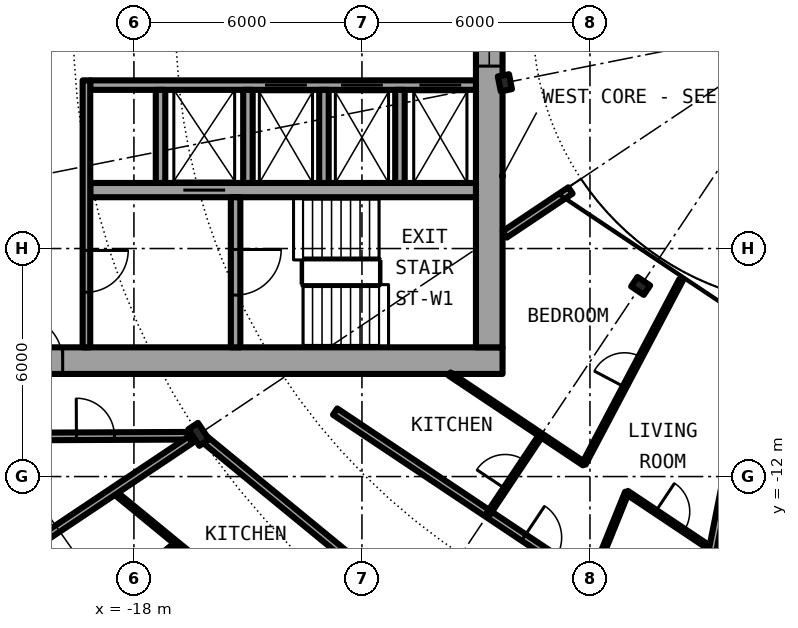
"""IFC4 building model, lengths in metres.
Left out: names, types, materials, properties, quantities, classifications, styles, units other than length and angle.
Written with IfcOpenShell. Run it as: python <this file> out.ifc"""

import sys

from ifc_helpers import new_model, si_unit, direction, frame, frame_2d, origin, origin_2d, place, context, subcontext, project, spatial, rectangle, i_section, extrude, element, fill, save


model = new_model("IFC4")
c1 = context("Model", 3, precision=1e-05, world=origin(), true_north=direction((0.0, 1.0)))
c2 = subcontext(c1, "Body", "Model", "MODEL_VIEW")
j1 = project(units=[si_unit("LENGTHUNIT", "METRE"), si_unit("PLANEANGLEUNIT", "RADIAN")], contexts=[c1])
p1 = place(None, origin())
s1 = spatial("IfcSite", under=j1, at=p1, CompositionType="ELEMENT")
p2 = place(p1, origin())
s2 = spatial("IfcBuilding", under=s1, at=p2, CompositionType="ELEMENT")
p3 = place(p2, frame((0.0, 0.0, 91.05)))
s3 = spatial("IfcBuildingStorey", under=s2, at=p3, CompositionType="ELEMENT", Elevation=91.05)
p4 = place(p3, frame((-16.297, -10.889, 0.0), z_axis=(0.0, 0.0, 1.0), x_axis=(-0.831469612303, -0.55557023302, 0.0)))
e1 = element("IfcColumn", 1, at=p4, inside=s3, PredefinedType="COLUMN", context=c2, shape_type="SweptSolid", body=[
    extrude(i_section(OverallWidth=0.306, OverallDepth=0.524, WebThickness=0.021, FlangeThickness=0.04, FilletRadius=0.027, at=origin_2d()), origin(), (0.0, 0.0, 1.0), 3.05),
])
for number, where, z_axis, x_axis in (
    (2, (-8.239, -1.639, 0.0), (0.0, 0.0, 1.0), (-0.981, -0.195, 0.0)),
    (3, (-4.667, -6.984, 0.0), (0.0, 0.0, 1.0), (-0.556, -0.831, 0.0)),
):
    element("IfcColumn", number, at=place(p3, frame(where, z_axis=z_axis, x_axis=x_axis)), inside=s3, PredefinedType="COLUMN", context=c2, shape_type="SweptSolid", body=[
        extrude(i_section(OverallWidth=0.3, OverallDepth=0.4, WebThickness=0.013, FlangeThickness=0.024, FilletRadius=0.027, at=origin_2d()), origin(), (0.0, 0.0, 1.0), 3.05),
    ])
p5 = place(p3, frame((-22.3, -8.95, 0.0), z_axis=(0.0, 0.0, 1.0), x_axis=(1.0, 0.0, 0.0)))
e4 = element("IfcWall", 4, at=p5, inside=s3, PredefinedType="SHEAR", context=c2, shape_type="SweptSolid", body=[
    extrude(rectangle(XDim=14.0, YDim=0.7, at=frame_2d((7.0, 0.0))), origin(), (0.0, 0.0, 1.0), 3.05),
])
p6 = place(p5, frame((1.225, 0.0, 0.0)))
e5 = element("IfcOpeningElement", 5, at=p6, cuts=e4, PredefinedType="OPENING", context=c2, shape_type="SweptSolid", body=[
    extrude(rectangle(XDim=1.2, YDim=2.3, at=frame_2d((0.6, 1.15))), frame((0.0, 0.36, 0.0), z_axis=(0.0, -1.0, 0.0), x_axis=(1.0, 0.0, 0.0)), (0.0, 0.0, 1.0), 0.72),
])
p7 = place(p3, frame((-8.65, 8.6, 0.0), z_axis=(0.0, 0.0, 1.0), x_axis=(0.0, -1.0, 0.0)))
e6 = element("IfcWall", 6, at=p7, inside=s3, PredefinedType="SHEAR", context=c2, shape_type="SweptSolid", body=[
    extrude(rectangle(XDim=17.2, YDim=0.7, at=frame_2d((8.6, 0.0))), origin(), (0.0, 0.0, 1.0), 3.05),
])
p8 = place(p7, frame((7.4, 0.0, 0.1)))
e7 = element("IfcOpeningElement", 7, at=p8, cuts=e6, PredefinedType="OPENING", context=c2, shape_type="SweptSolid", body=[
    extrude(rectangle(XDim=2.4, YDim=2.2, at=frame_2d((1.2, 1.1))), frame((0.0, 0.36, 0.0), z_axis=(0.0, -1.0, 0.0), x_axis=(1.0, 0.0, 0.0)), (0.0, 0.0, 1.0), 0.72),
])
p9 = place(p3, frame((-9.0, -1.7, 0.0), z_axis=(0.0, 0.0, 1.0), x_axis=(-1.0, 0.0, 0.0)))
e8 = element("IfcWall", 8, at=p9, inside=s3, PredefinedType="SHEAR", context=c2, shape_type="SweptSolid", body=[
    extrude(rectangle(XDim=10.15, YDim=0.25, at=frame_2d((5.075, 0.0))), origin(), (0.0, 0.0, 1.0), 3.05),
])
p10 = place(p9, frame((0.387, 0.0, 0.0)))
e9 = element("IfcOpeningElement", 9, at=p10, cuts=e8, PredefinedType="OPENING", context=c2, shape_type="SweptSolid", body=[
    extrude(rectangle(XDim=1.1, YDim=2.3, at=frame_2d((0.55, 1.15))), frame((0.0, 0.135, 0.0), z_axis=(0.0, -1.0, 0.0), x_axis=(1.0, 0.0, 0.0)), (0.0, 0.0, 1.0), 0.27),
])
p11 = place(p9, frame((2.45, 0.0, 0.0)))
e10 = element("IfcOpeningElement", 10, at=p11, cuts=e8, PredefinedType="OPENING", context=c2, shape_type="SweptSolid", body=[
    extrude(rectangle(XDim=1.1, YDim=2.3, at=frame_2d((0.55, 1.15))), frame((0.0, 0.135, 0.0), z_axis=(0.0, -1.0, 0.0), x_axis=(1.0, 0.0, 0.0)), (0.0, 0.0, 1.0), 0.27),
])
p12 = place(p9, frame((4.45, 0.0, 0.0)))
e11 = element("IfcOpeningElement", 11, at=p12, cuts=e8, PredefinedType="OPENING", context=c2, shape_type="SweptSolid", body=[
    extrude(rectangle(XDim=1.1, YDim=2.3, at=frame_2d((0.55, 1.15))), frame((0.0, 0.135, 0.0), z_axis=(0.0, -1.0, 0.0), x_axis=(1.0, 0.0, 0.0)), (0.0, 0.0, 1.0), 0.27),
])
p13 = place(p3, frame((-9.0, -4.462, 0.0), z_axis=(0.0, 0.0, 1.0), x_axis=(-1.0, 0.0, 0.0)))
e12 = element("IfcWall", 12, at=p13, inside=s3, PredefinedType="SHEAR", context=c2, shape_type="SweptSolid", body=[
    extrude(rectangle(XDim=10.15, YDim=0.375, at=frame_2d((5.075, 0.0))), origin(), (0.0, 0.0, 1.0), 3.05),
])
p14 = place(p13, frame((6.6, 0.0, 0.0)))
e13 = element("IfcOpeningElement", 13, at=p14, cuts=e12, PredefinedType="OPENING", context=c2, shape_type="SweptSolid", body=[
    extrude(rectangle(XDim=1.1, YDim=2.3, at=frame_2d((0.55, 1.15))), frame((0.0, 0.198, 0.0), z_axis=(0.0, -1.0, 0.0), x_axis=(1.0, 0.0, 0.0)), (0.0, 0.0, 1.0), 0.395),
])
p15 = place(p3, frame((-15.325, -4.65, 0.0), z_axis=(0.0, 0.0, 1.0), x_axis=(0.0, -1.0, 0.0)))
e14 = element("IfcWall", 14, at=p15, inside=s3, PredefinedType="SHEAR", context=c2, shape_type="SweptSolid", body=[
    extrude(rectangle(XDim=3.95, YDim=0.25, at=frame_2d((1.975, 0.0))), origin(), (0.0, 0.0, 1.0), 3.05),
])
p16 = place(p15, frame((1.375, 0.0, 0.0)))
e15 = element("IfcOpeningElement", 15, at=p16, cuts=e14, PredefinedType="OPENING", context=c2, shape_type="SweptSolid", body=[
    extrude(rectangle(XDim=1.2, YDim=2.3, at=frame_2d((0.6, 1.15))), frame((0.0, 0.135, 0.0), z_axis=(0.0, -1.0, 0.0), x_axis=(1.0, 0.0, 0.0)), (0.0, 0.0, 1.0), 0.27),
])
for number, where, z_axis, x_axis in (
    (16, (-15.0, -1.825, 0.0), (0.0, 0.0, 1.0), (0.0, -1.0, 0.0)),
    (17, (-17.3, -1.825, 0.0), (0.0, 0.0, 1.0), (0.0, -1.0, 0.0)),
):
    element("IfcWall", number, at=place(p3, frame(where, z_axis=z_axis, x_axis=x_axis)), inside=s3, PredefinedType="SOLIDWALL", context=c2, shape_type="SweptSolid", body=[
        extrude(rectangle(XDim=2.45, YDim=0.25, at=frame_2d((1.225, 0.0))), origin(), (0.0, 0.0, 1.0), 2.7),
    ])
p17 = place(p3, frame((-19.25, -1.575, 0.0), z_axis=(0.0, 0.0, 1.0), x_axis=(0.0, -1.0, 0.0)))
e18 = element("IfcWall", 18, at=p17, inside=s3, PredefinedType="SOLIDWALL", context=c2, shape_type="SweptSolid", body=[
    extrude(rectangle(XDim=7.025, YDim=0.2, at=frame_2d((3.513, 0.0))), origin(), (0.0, 0.0, 1.0), 2.7),
])
p18 = place(p17, frame((4.475, 0.0, 0.0)))
e19 = element("IfcOpeningElement", 19, at=p18, cuts=e18, PredefinedType="OPENING", context=c2, shape_type="SweptSolid", body=[
    extrude(rectangle(XDim=1.1, YDim=2.3, at=frame_2d((0.55, 1.15))), frame((0.0, 0.11, 0.0), z_axis=(0.0, -1.0, 0.0), x_axis=(1.0, 0.0, 0.0)), (0.0, 0.0, 1.0), 0.22),
])
for number, where, z_axis, x_axis in (
    (20, (-11.0, -1.825, 0.0), (0.0, 0.0, 1.0), (0.0, -1.0, 0.0)),
    (21, (-13.0, -1.825, 0.0), (0.0, 0.0, 1.0), (0.0, -1.0, 0.0)),
):
    element("IfcWall", number, at=place(p3, frame(where, z_axis=z_axis, x_axis=x_axis)), inside=s3, PredefinedType="SOLIDWALL", context=c2, shape_type="SweptSolid", body=[
        extrude(rectangle(XDim=2.45, YDim=0.25, at=frame_2d((1.225, 0.0))), origin(), (0.0, 0.0, 1.0), 2.7),
    ])
p19 = place(p3, frame((-18.542, -12.389, 0.0), z_axis=(0.0, 0.0, 1.0), x_axis=(0.77296666644, -0.634446634929, 0.0)))
e22 = element("IfcWall", 22, at=p19, inside=s3, PredefinedType="PARTITIONING", context=c2, shape_type="SweptSolid", body=[
    extrude(rectangle(XDim=6.474, YDim=0.1, at=frame_2d((3.237, 0.0))), origin(), (0.0, 0.0, 1.0), 2.7),
])
p20 = place(p3, frame((-16.173, -10.991, 0.0), z_axis=(0.0, 0.0, 1.0), x_axis=(0.773013989296, -0.634388975591, 0.0)))
e23 = element("IfcWall", 23, at=p20, inside=s3, PredefinedType="PARTITIONING", context=c2, shape_type="SweptSolid", body=[
    extrude(rectangle(XDim=11.219, YDim=0.2, at=frame_2d((5.609, 0.0))), origin(), (0.0, 0.0, 1.0), 2.38),
])
p21 = place(p20, frame((6.278, 0.0, 0.0)))
e24 = element("IfcOpeningElement", 24, at=p21, cuts=e23, PredefinedType="OPENING", context=c2, shape_type="SweptSolid", body=[
    extrude(rectangle(XDim=1.0, YDim=2.3, at=frame_2d((0.5, 1.15))), frame((0.0, 0.11, 0.0), z_axis=(0.0, -1.0, 0.0), x_axis=(1.0, 0.0, 0.0)), (0.0, 0.0, 1.0), 0.22),
])
p22 = place(p3, frame((-12.706, -10.291, 0.0), z_axis=(0.0, 0.0, 1.0), x_axis=(0.831588572532, -0.555392155178, 0.0)))
e25 = element("IfcWall", 25, at=p22, inside=s3, PredefinedType="PARTITIONING", context=c2, shape_type="SweptSolid", body=[
    extrude(rectangle(XDim=11.314, YDim=0.2, at=frame_2d((5.657, 0.0))), origin(), (0.0, 0.0, 1.0), 2.7),
])
p23 = place(p22, frame((5.966, 0.0, 0.0)))
e26 = element("IfcOpeningElement", 26, at=p23, cuts=e25, PredefinedType="OPENING", context=c2, shape_type="SweptSolid", body=[
    extrude(rectangle(XDim=1.0, YDim=2.3, at=frame_2d((0.5, 1.15))), frame((0.0, 0.11, 0.0), z_axis=(0.0, -1.0, 0.0), x_axis=(1.0, 0.0, 0.0)), (0.0, 0.0, 1.0), 0.22),
])
p24 = place(p3, frame((-2.772, -13.927, 0.0), z_axis=(0.0, 0.0, 1.0), x_axis=(0.998787571158, 0.04922791586, 0.0)))
e27 = element("IfcWall", 27, at=p24, inside=s3, PredefinedType="PARTITIONING", context=c2, shape_type="SweptSolid", body=[
    extrude(rectangle(XDim=2.762, YDim=0.1, at=frame_2d((1.381, 0.0))), origin(), (0.0, 0.0, 1.0), 2.7),
])
p25 = place(p24, frame((0.933, 0.0, 0.0)))
e28 = element("IfcOpeningElement", 28, at=p25, cuts=e27, PredefinedType="OPENING", context=c2, shape_type="SweptSolid", body=[
    extrude(rectangle(XDim=0.9, YDim=2.3, at=frame_2d((0.45, 1.15))), frame((0.0, 0.06, 0.0), z_axis=(0.0, -1.0, 0.0), x_axis=(1.0, 0.0, 0.0)), (0.0, 0.0, 1.0), 0.12),
])
p26 = place(p3, frame((-9.693, -9.302, 0.0), z_axis=(0.0, 0.0, 1.0), x_axis=(0.831546497949, -0.555455148278, 0.0)))
e29 = element("IfcWall", 29, at=p26, inside=s3, PredefinedType="PARTITIONING", context=c2, shape_type="SweptSolid", body=[
    extrude(rectangle(XDim=4.252, YDim=0.1, at=frame_2d((2.126, 0.0))), origin(), (0.0, 0.0, 1.0), 2.7),
])
p27 = place(p3, frame((-5.029, -12.418, 0.0), z_axis=(0.0, 0.0, 1.0), x_axis=(0.831538390496, -0.555467285384, 0.0)))
e30 = element("IfcWall", 30, at=p27, inside=s3, PredefinedType="PARTITIONING", context=c2, shape_type="SweptSolid", body=[
    extrude(rectangle(XDim=2.717, YDim=0.1, at=frame_2d((1.358, 0.0))), origin(), (0.0, 0.0, 1.0), 2.7),
])
p28 = place(p27, frame((0.908, 0.0, 0.0)))
e31 = element("IfcOpeningElement", 31, at=p28, cuts=e30, PredefinedType="OPENING", context=c2, shape_type="SweptSolid", body=[
    extrude(rectangle(XDim=0.9, YDim=2.3, at=frame_2d((0.45, 1.15))), frame((0.0, 0.06, 0.0), z_axis=(0.0, -1.0, 0.0), x_axis=(1.0, 0.0, 0.0)), (0.0, 0.0, 1.0), 0.12),
])
p29 = place(p3, frame((-21.675, -10.95, 0.0), z_axis=(0.0, 0.0, 1.0), x_axis=(0.999988944514, 0.004702217579, 0.0)))
e32 = element("IfcWall", 32, at=p29, inside=s3, PredefinedType="PARTITIONING", context=c2, shape_type="SweptSolid", body=[
    extrude(rectangle(XDim=5.088, YDim=0.2, at=frame_2d((2.544, 0.0))), origin(), (0.0, 0.0, 1.0), 2.7),
])
p30 = place(p29, frame((2.162, 0.0, 0.0)))
e33 = element("IfcOpeningElement", 33, at=p30, cuts=e32, PredefinedType="OPENING", context=c2, shape_type="SweptSolid", body=[
    extrude(rectangle(XDim=1.0, YDim=2.3, at=frame_2d((0.5, 1.15))), frame((0.0, 0.11, 0.0), z_axis=(0.0, -1.0, 0.0), x_axis=(1.0, 0.0, 0.0)), (0.0, 0.0, 1.0), 0.22),
])
p31 = place(p3, frame((-6.513, -4.472, 0.0), z_axis=(0.0, 0.0, 1.0), x_axis=(-0.831382204863, -0.555701025225, 0.0)))
e34 = element("IfcWall", 34, at=p31, inside=s3, PredefinedType="PARTITIONING", context=c2, shape_type="SweptSolid", body=[
    extrude(rectangle(XDim=2.082, YDim=0.2, at=frame_2d((1.041, 0.0))), origin(), (0.0, 0.0, 1.0), 2.7),
])
p32 = place(p3, frame((-22.595, -15.097, 0.0), z_axis=(0.0, 0.0, 1.0), x_axis=(0.831505405283, 0.555516661303, 0.0)))
e35 = element("IfcWall", 35, at=p32, inside=s3, PredefinedType="PARTITIONING", context=c2, shape_type="SweptSolid", body=[
    extrude(rectangle(XDim=7.312, YDim=0.2, at=frame_2d((3.656, 0.0))), origin(), (0.0, 0.0, 1.0), 2.7),
])
p33 = place(p3, frame((-21.061, -17.173, 0.0), z_axis=(0.0, 0.0, 1.0), x_axis=(0.774926754572, 0.632051046236, 0.0)))
e36 = element("IfcWall", 36, at=p33, inside=s3, PredefinedType="PARTITIONING", context=c2, shape_type="SweptSolid", body=[
    extrude(rectangle(XDim=5.403, YDim=0.1, at=frame_2d((2.702, 0.0))), origin(), (0.0, 0.0, 1.0), 2.7),
])
p34 = place(p33, frame((2.252, 0.0, 0.0)))
e37 = element("IfcOpeningElement", 37, at=p34, cuts=e36, PredefinedType="OPENING", context=c2, shape_type="SweptSolid", body=[
    extrude(rectangle(XDim=0.9, YDim=2.3, at=frame_2d((0.45, 1.15))), frame((0.0, 0.06, 0.0), z_axis=(0.0, -1.0, 0.0), x_axis=(1.0, 0.0, 0.0)), (0.0, 0.0, 1.0), 0.12),
])
p35 = place(p3, frame((-8.674, -12.982, 0.0), z_axis=(0.0, 0.0, 1.0), x_axis=(0.555355163998, 0.831613276602, 0.0)))
e38 = element("IfcWall", 38, at=p35, inside=s3, PredefinedType="PARTITIONING", context=c2, shape_type="SweptSolid", body=[
    extrude(rectangle(XDim=2.494, YDim=0.1, at=frame_2d((1.247, 0.0))), origin(), (0.0, 0.0, 1.0), 2.7),
])
p36 = place(p35, frame((0.797, 0.0, 0.0)))
e39 = element("IfcOpeningElement", 39, at=p36, cuts=e38, PredefinedType="OPENING", context=c2, shape_type="SweptSolid", body=[
    extrude(rectangle(XDim=0.9, YDim=2.3, at=frame_2d((0.45, 1.15))), frame((0.0, 0.06, 0.0), z_axis=(0.0, -1.0, 0.0), x_axis=(1.0, 0.0, 0.0)), (0.0, 0.0, 1.0), 0.12),
])
p37 = place(p3, frame((-6.158, -11.663, 0.0), z_axis=(0.0, 0.0, 1.0), x_axis=(0.466976820365, 0.884269556889, 0.0)))
e40 = element("IfcWall", 40, at=p37, inside=s3, PredefinedType="PARTITIONING", context=c2, shape_type="SweptSolid", body=[
    extrude(rectangle(XDim=5.469, YDim=0.1, at=frame_2d((2.735, 0.0))), origin(), (0.0, 0.0, 1.0), 2.7),
])
p38 = place(p37, frame((2.284, 0.0, 0.0)))
e41 = element("IfcOpeningElement", 41, at=p38, cuts=e40, PredefinedType="OPENING", context=c2, shape_type="SweptSolid", body=[
    extrude(rectangle(XDim=0.9, YDim=2.3, at=frame_2d((0.45, 1.15))), frame((0.0, 0.06, 0.0), z_axis=(0.0, -1.0, 0.0), x_axis=(1.0, 0.0, 0.0)), (0.0, 0.0, 1.0), 0.12),
])
p39 = place(p3, frame((-5.986, -14.779, 0.0), z_axis=(0.0, 0.0, 1.0), x_axis=(0.375649498413, 0.926761811008, 0.0)))
e42 = element("IfcWall", 42, at=p39, inside=s3, PredefinedType="PARTITIONING", context=c2, shape_type="SweptSolid", body=[
    extrude(rectangle(XDim=2.548, YDim=0.1, at=frame_2d((1.274, 0.0))), origin(), (0.0, 0.0, 1.0), 2.7),
])
p40 = place(p3, frame((-3.297, -16.575, 0.0), z_axis=(0.0, 0.0, 1.0), x_axis=(0.19511354088, 0.980780661598, 0.0)))
e43 = element("IfcWall", 43, at=p40, inside=s3, PredefinedType="PARTITIONING", context=c2, shape_type="SweptSolid", body=[
    extrude(rectangle(XDim=9.179, YDim=0.2, at=frame_2d((4.59, 0.0))), origin(), (0.0, 0.0, 1.0), 2.7),
])
p41 = place(p10, origin())
e44 = element("IfcDoor", 44, at=p41, inside=s3, OperationType="DOUBLE_DOOR_SLIDING", PredefinedType="DOOR", context=c2, shape_type="SweptSolid", body=[
    extrude(rectangle(XDim=1.1, YDim=2.3, at=frame_2d((0.55, 1.15))), frame((0.0, 0.025, 0.0), z_axis=(0.0, -1.0, 0.0), x_axis=(1.0, 0.0, 0.0)), (0.0, 0.0, 1.0), 0.05),
])
fill(e9, e44)
p42 = place(p11, origin())
e45 = element("IfcDoor", 45, at=p42, inside=s3, OperationType="DOUBLE_DOOR_SLIDING", PredefinedType="DOOR", context=c2, shape_type="SweptSolid", body=[
    extrude(rectangle(XDim=1.1, YDim=2.3, at=frame_2d((0.55, 1.15))), frame((0.0, 0.025, 0.0), z_axis=(0.0, -1.0, 0.0), x_axis=(1.0, 0.0, 0.0)), (0.0, 0.0, 1.0), 0.05),
])
fill(e10, e45)
p43 = place(p12, origin())
e46 = element("IfcDoor", 46, at=p43, inside=s3, OperationType="DOUBLE_DOOR_SLIDING", PredefinedType="DOOR", context=c2, shape_type="SweptSolid", body=[
    extrude(rectangle(XDim=1.1, YDim=2.3, at=frame_2d((0.55, 1.15))), frame((0.0, 0.025, 0.0), z_axis=(0.0, -1.0, 0.0), x_axis=(1.0, 0.0, 0.0)), (0.0, 0.0, 1.0), 0.05),
])
fill(e11, e46)
p44 = place(p14, origin())
e47 = element("IfcDoor", 47, at=p44, inside=s3, OperationType="DOUBLE_DOOR_SLIDING", PredefinedType="DOOR", context=c2, shape_type="SweptSolid", body=[
    extrude(rectangle(XDim=1.1, YDim=2.3, at=frame_2d((0.55, 1.15))), frame((0.0, 0.025, 0.0), z_axis=(0.0, -1.0, 0.0), x_axis=(1.0, 0.0, 0.0)), (0.0, 0.0, 1.0), 0.05),
])
fill(e13, e47)
p45 = place(p16, origin())
e48 = element("IfcDoor", 48, at=p45, inside=s3, OperationType="SINGLE_SWING_LEFT", PredefinedType="DOOR", context=c2, shape_type="SweptSolid", body=[
    extrude(rectangle(XDim=1.2, YDim=2.3, at=frame_2d((0.6, 1.15))), frame((0.0, 0.025, 0.0), z_axis=(0.0, -1.0, 0.0), x_axis=(1.0, 0.0, 0.0)), (0.0, 0.0, 1.0), 0.05),
])
fill(e15, e48)
p46 = place(p18, origin())
e49 = element("IfcDoor", 49, at=p46, inside=s3, OperationType="SINGLE_SWING_LEFT", PredefinedType="DOOR", context=c2, shape_type="SweptSolid", body=[
    extrude(rectangle(XDim=1.1, YDim=2.3, at=frame_2d((0.55, 1.15))), frame((0.0, 0.025, 0.0), z_axis=(0.0, -1.0, 0.0), x_axis=(1.0, 0.0, 0.0)), (0.0, 0.0, 1.0), 0.05),
])
fill(e19, e49)
p47 = place(p6, origin())
e50 = element("IfcDoor", 50, at=p47, inside=s3, OperationType="SINGLE_SWING_RIGHT", PredefinedType="DOOR", context=c2, shape_type="SweptSolid", body=[
    extrude(rectangle(XDim=1.2, YDim=2.3, at=frame_2d((0.6, 1.15))), frame((0.0, 0.025, 0.0), z_axis=(0.0, -1.0, 0.0), x_axis=(1.0, 0.0, 0.0)), (0.0, 0.0, 1.0), 0.05),
])
fill(e5, e50)
p48 = place(p8, origin())
e51 = element("IfcWindow", 51, at=p48, inside=s3, PartitioningType="SINGLE_PANEL", PredefinedType="WINDOW", context=c2, shape_type="SweptSolid", body=[
    extrude(rectangle(XDim=2.4, YDim=2.2, at=frame_2d((1.2, 1.1))), frame((0.0, 0.03, 0.0), z_axis=(0.0, -1.0, 0.0), x_axis=(1.0, 0.0, 0.0)), (0.0, 0.0, 1.0), 0.06),
])
fill(e7, e51)
p49 = place(p23, origin())
e52 = element("IfcDoor", 52, at=p49, inside=s3, OperationType="SINGLE_SWING_RIGHT", PredefinedType="DOOR", context=c2, shape_type="SweptSolid", body=[
    extrude(rectangle(XDim=1.0, YDim=2.3, at=frame_2d((0.5, 1.15))), frame((0.0, 0.025, 0.0), z_axis=(0.0, -1.0, 0.0), x_axis=(1.0, 0.0, 0.0)), (0.0, 0.0, 1.0), 0.05),
])
fill(e26, e52)
p50 = place(p28, origin())
e53 = element("IfcDoor", 53, at=p50, inside=s3, OperationType="SINGLE_SWING_LEFT", PredefinedType="DOOR", context=c2, shape_type="SweptSolid", body=[
    extrude(rectangle(XDim=0.9, YDim=2.3, at=frame_2d((0.45, 1.15))), frame((0.0, 0.025, 0.0), z_axis=(0.0, -1.0, 0.0), x_axis=(1.0, 0.0, 0.0)), (0.0, 0.0, 1.0), 0.05),
])
fill(e31, e53)
p51 = place(p36, origin())
e54 = element("IfcDoor", 54, at=p51, inside=s3, OperationType="SINGLE_SWING_RIGHT", PredefinedType="DOOR", context=c2, shape_type="SweptSolid", body=[
    extrude(rectangle(XDim=0.9, YDim=2.3, at=frame_2d((0.45, 1.15))), frame((0.0, 0.025, 0.0), z_axis=(0.0, -1.0, 0.0), x_axis=(1.0, 0.0, 0.0)), (0.0, 0.0, 1.0), 0.05),
])
fill(e39, e54)
p52 = place(p38, origin())
e55 = element("IfcDoor", 55, at=p52, inside=s3, OperationType="SINGLE_SWING_LEFT", PredefinedType="DOOR", context=c2, shape_type="SweptSolid", body=[
    extrude(rectangle(XDim=0.9, YDim=2.3, at=frame_2d((0.45, 1.15))), frame((0.0, 0.025, 0.0), z_axis=(0.0, -1.0, 0.0), x_axis=(1.0, 0.0, 0.0)), (0.0, 0.0, 1.0), 0.05),
])
fill(e41, e55)
p53 = place(p30, origin())
e56 = element("IfcDoor", 56, at=p53, inside=s3, OperationType="SINGLE_SWING_RIGHT", PredefinedType="DOOR", context=c2, shape_type="SweptSolid", body=[
    extrude(rectangle(XDim=1.0, YDim=2.3, at=frame_2d((0.5, 1.15))), frame((0.0, 0.025, 0.0), z_axis=(0.0, -1.0, 0.0), x_axis=(1.0, 0.0, 0.0)), (0.0, 0.0, 1.0), 0.05),
])
fill(e33, e56)
save(model, sys.argv[1])
